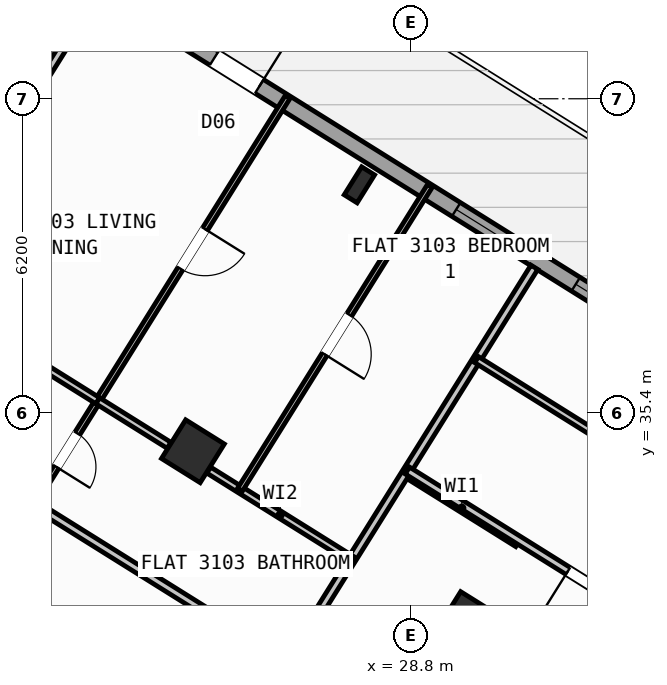
"""IFC4 building model, lengths in metres.
Left out: names, types, materials, properties, quantities, classifications, styles, units other than length and angle.
Written with IfcOpenShell. Run it as: python <this file> out.ifc"""

import sys

from ifc_helpers import new_model, si_unit, direction, frame, frame_2d, origin, origin_2d, place, context, subcontext, project, spatial, rectangle, hollow_rectangle, i_section, extrude, source, transform, mapped, element, fill, save


model = new_model("IFC4")
c1 = context("Model", 3, precision=1e-05, world=origin(), true_north=direction((0.0, 1.0)))
c2 = subcontext(c1, "Body", "Model", "MODEL_VIEW")
j1 = project(units=[si_unit("LENGTHUNIT", "METRE"), si_unit("PLANEANGLEUNIT", "RADIAN")], contexts=[c1])
p1 = place(None, origin())
s1 = spatial("IfcSite", under=j1, at=p1, CompositionType="ELEMENT")
p2 = place(p1, origin())
s2 = spatial("IfcBuilding", under=s1, at=p2, CompositionType="ELEMENT")
p3 = place(p2, frame((0.0, 0.0, 123.3)))
s3 = spatial("IfcBuildingStorey", under=s2, at=p3, CompositionType="ELEMENT", Elevation=123.3)
m1 = source(origin(), c2, "Body", "SweptSolid", [
    extrude(hollow_rectangle(XDim=0.9, YDim=0.9, WallThickness=0.036, at=origin_2d()), origin(), (0.0, 0.0, 1.0), 4.5),
])
p4 = place(p3, frame((29.928, 31.251, 0.0), z_axis=(0.0, 0.0, 1.0), x_axis=(-0.848048096156, 0.529919264233, 0.0)))
e1 = element("IfcColumn", 1, at=p4, inside=s3, PredefinedType="COLUMN", context=c2, shape_type="MappedRepresentation", body=[
    mapped(m1, transform((0.0, 0.0, 0.0), scale=1.0)),
])
m2 = source(origin(), c2, "Body", "SweptSolid", [
    extrude(i_section(OverallWidth=0.3, OverallDepth=0.65, WebThickness=0.016, FlangeThickness=0.031, at=origin_2d()), origin(), (0.0, 0.0, 1.0), 4.5),
])
p5 = place(p3, frame((27.786, 39.901, 0.0), z_axis=(0.0, 0.0, 1.0), x_axis=(-0.848048096156, 0.529919264233, 0.0)))
e2 = element("IfcColumn", 2, at=p5, inside=s3, PredefinedType="COLUMN", context=c2, shape_type="MappedRepresentation", body=[
    mapped(m2, transform((0.0, 0.0, 0.0), scale=1.0)),
])
p6 = place(p3, frame((24.5, 34.643, 0.0), z_axis=(0.0, 0.0, 1.0), x_axis=(-0.848048096156, 0.529919264233, 0.0)))
e3 = element("IfcColumn", 3, at=p6, inside=s3, PredefinedType="COLUMN", context=c2, shape_type="MappedRepresentation", body=[
    mapped(m1, transform((0.0, 0.0, 0.0), scale=1.0)),
])
p7 = place(p3, frame((17.424, 47.083, 0.0), z_axis=(0.0, 0.0, 1.0), x_axis=(0.848049927979, -0.529916332693, 0.0)))
e4 = element("IfcWall", 4, at=p7, inside=s3, PredefinedType="STANDARD", context=c2, shape_type="SweptSolid", body=[
    extrude(rectangle(XDim=29.223, YDim=0.32, at=frame_2d((14.612, 0.0))), origin(), (0.0, 0.0, 1.0), 4.22),
])
p8 = place(p7, frame((8.839, 0.0, 0.0)))
e5 = element("IfcOpeningElement", 5, at=p8, cuts=e4, PredefinedType="OPENING", context=c2, shape_type="SweptSolid", body=[
    extrude(rectangle(XDim=1.05, YDim=2.15, at=frame_2d((0.525, 1.075))), frame((0.0, 0.17, 0.0), z_axis=(0.0, -1.0, 0.0), x_axis=(1.0, 0.0, 0.0)), (0.0, 0.0, 1.0), 0.34),
])
p9 = place(p7, frame((0.719, 0.0, 0.85)))
e6 = element("IfcOpeningElement", 6, at=p9, cuts=e4, PredefinedType="OPENING", context=c2, shape_type="SweptSolid", body=[
    extrude(rectangle(XDim=1.8, YDim=1.5, at=frame_2d((0.9, 0.75))), frame((0.0, 0.17, 0.0), z_axis=(0.0, -1.0, 0.0), x_axis=(1.0, 0.0, 0.0)), (0.0, 0.0, 1.0), 0.34),
])
p10 = place(p7, frame((3.981, 0.0, 0.85)))
e7 = element("IfcOpeningElement", 7, at=p10, cuts=e4, PredefinedType="OPENING", context=c2, shape_type="SweptSolid", body=[
    extrude(rectangle(XDim=1.5, YDim=1.5, at=frame_2d((0.75, 0.75))), frame((0.0, 0.17, 0.0), z_axis=(0.0, -1.0, 0.0), x_axis=(1.0, 0.0, 0.0)), (0.0, 0.0, 1.0), 0.34),
])
p11 = place(p7, frame((7.021, 0.0, 0.95)))
e8 = element("IfcOpeningElement", 8, at=p11, cuts=e4, PredefinedType="OPENING", context=c2, shape_type="SweptSolid", body=[
    extrude(rectangle(XDim=1.2, YDim=1.4, at=frame_2d((0.6, 0.7))), frame((0.0, 0.17, 0.0), z_axis=(0.0, -1.0, 0.0), x_axis=(1.0, 0.0, 0.0)), (0.0, 0.0, 1.0), 0.34),
])
p12 = place(p7, frame((14.471, 0.0, 0.95)))
e9 = element("IfcOpeningElement", 9, at=p12, cuts=e4, PredefinedType="OPENING", context=c2, shape_type="SweptSolid", body=[
    extrude(rectangle(XDim=1.2, YDim=1.4, at=frame_2d((0.6, 0.7))), frame((0.0, 0.17, 0.0), z_axis=(0.0, -1.0, 0.0), x_axis=(1.0, 0.0, 0.0)), (0.0, 0.0, 1.0), 0.34),
])
p13 = place(p7, frame((17.254, 0.0, 1.0)))
e10 = element("IfcOpeningElement", 10, at=p13, cuts=e4, PredefinedType="OPENING", context=c2, shape_type="SweptSolid", body=[
    extrude(rectangle(XDim=0.9, YDim=1.25, at=frame_2d((0.45, 0.625))), frame((0.0, 0.17, 0.0), z_axis=(0.0, -1.0, 0.0), x_axis=(1.0, 0.0, 0.0)), (0.0, 0.0, 1.0), 0.34),
])
p14 = place(p7, frame((20.764, 0.0, 0.8)))
e11 = element("IfcOpeningElement", 11, at=p14, cuts=e4, PredefinedType="OPENING", context=c2, shape_type="SweptSolid", body=[
    extrude(rectangle(XDim=2.1, YDim=1.55, at=frame_2d((1.05, 0.775))), frame((0.0, 0.17, 0.0), z_axis=(0.0, -1.0, 0.0), x_axis=(1.0, 0.0, 0.0)), (0.0, 0.0, 1.0), 0.34),
])
p15 = place(p7, frame((25.403, 0.0, 0.8)))
e12 = element("IfcOpeningElement", 12, at=p15, cuts=e4, PredefinedType="OPENING", context=c2, shape_type="SweptSolid", body=[
    extrude(rectangle(XDim=2.1, YDim=1.55, at=frame_2d((1.05, 0.775))), frame((0.0, 0.17, 0.0), z_axis=(0.0, -1.0, 0.0), x_axis=(1.0, 0.0, 0.0)), (0.0, 0.0, 1.0), 0.34),
])
p16 = place(p3, frame((30.914, 32.829, 0.0), z_axis=(0.0, 0.0, 1.0), x_axis=(-0.848008813643, 0.529982124211, 0.0)))
e13 = element("IfcWall", 13, at=p16, inside=s3, PredefinedType="PARTITIONING", context=c2, shape_type="SweptSolid", body=[
    extrude(rectangle(XDim=2.61, YDim=0.16, at=frame_2d((1.305, 0.0))), origin(), (0.0, 0.0, 1.0), 4.21),
])
p17 = place(p3, frame((31.239, 38.274, 0.0), z_axis=(0.0, 0.0, 1.0), x_axis=(-0.529920220799, -0.848047498427, 0.0)))
e14 = element("IfcWall", 14, at=p17, inside=s3, PredefinedType="PARTITIONING", context=c2, shape_type="SweptSolid", body=[
    extrude(rectangle(XDim=9.2, YDim=0.16, at=frame_2d((4.6, 0.0))), origin(), (0.0, 0.0, 1.0), 4.21),
])
p18 = place(p3, frame((26.363, 30.472, 0.0), z_axis=(0.0, 0.0, 1.0), x_axis=(-0.848052408131, 0.529912363569, 0.0)))
e15 = element("IfcWall", 15, at=p18, inside=s3, PredefinedType="PARTITIONING", context=c2, shape_type="SweptSolid", body=[
    extrude(rectangle(XDim=16.73, YDim=0.16, at=frame_2d((8.365, 0.0))), origin(), (0.0, 0.0, 1.0), 4.21),
])
p19 = place(p18, frame((7.55, 0.0, 0.0)))
e16 = element("IfcOpeningElement", 16, at=p19, cuts=e15, PredefinedType="OPENING", context=c2, shape_type="SweptSolid", body=[
    extrude(rectangle(XDim=1.0, YDim=2.1, at=frame_2d((0.5, 1.05))), frame((0.0, 0.09, 0.0), z_axis=(0.0, -1.0, 0.0), x_axis=(1.0, 0.0, 0.0)), (0.0, 0.0, 1.0), 0.18),
])
p20 = place(p18, frame((11.14, 0.0, 0.0)))
e17 = element("IfcOpeningElement", 17, at=p20, cuts=e15, PredefinedType="OPENING", context=c2, shape_type="SweptSolid", body=[
    extrude(rectangle(XDim=1.0, YDim=2.1, at=frame_2d((0.5, 1.05))), frame((0.0, 0.09, 0.0), z_axis=(0.0, -1.0, 0.0), x_axis=(1.0, 0.0, 0.0)), (0.0, 0.0, 1.0), 0.18),
])
p21 = place(p3, frame((25.198, 28.606, 0.0), z_axis=(0.0, 0.0, 1.0), x_axis=(-0.848052408131, 0.529912363569, 0.0)))
e18 = element("IfcWall", 18, at=p21, inside=s3, PredefinedType="PARTITIONING", context=c2, shape_type="SweptSolid", body=[
    extrude(rectangle(XDim=16.73, YDim=0.16, at=frame_2d((8.365, 0.0))), origin(), (0.0, 0.0, 1.0), 4.21),
])
p22 = place(p21, frame((2.22, 0.0, 0.0)))
e19 = element("IfcOpeningElement", 19, at=p22, cuts=e18, PredefinedType="OPENING", context=c2, shape_type="SweptSolid", body=[
    extrude(rectangle(XDim=0.86, YDim=2.05, at=frame_2d((0.43, 1.025))), frame((0.0, 0.09, 0.0), z_axis=(0.0, -1.0, 0.0), x_axis=(1.0, 0.0, 0.0)), (0.0, 0.0, 1.0), 0.18),
])
p23 = place(p21, frame((12.084, 0.0, 0.0)))
e20 = element("IfcOpeningElement", 20, at=p23, cuts=e18, PredefinedType="OPENING", context=c2, shape_type="SweptSolid", body=[
    extrude(rectangle(XDim=1.0, YDim=2.1, at=frame_2d((0.5, 1.05))), frame((0.0, 0.09, 0.0), z_axis=(0.0, -1.0, 0.0), x_axis=(1.0, 0.0, 0.0)), (0.0, 0.0, 1.0), 0.18),
])
p24 = place(p3, frame((22.18, 43.006, 0.0), z_axis=(0.0, 0.0, 1.0), x_axis=(-0.529913610495, -0.848051628978, 0.0)))
e21 = element("IfcWall", 21, at=p24, inside=s3, PredefinedType="PARTITIONING", context=c2, shape_type="SweptSolid", body=[
    extrude(rectangle(XDim=5.401, YDim=0.16, at=frame_2d((2.7, 0.0))), origin(), (0.0, 0.0, 1.0), 4.21),
])
p25 = place(p3, frame((26.37, 41.635, 0.0), z_axis=(0.0, 0.0, 1.0), x_axis=(-0.529917830441, -0.848048992088, 0.0)))
e22 = element("IfcWall", 22, at=p25, inside=s3, PredefinedType="PARTITIONING", context=c2, shape_type="SweptSolid", body=[
    extrude(rectangle(XDim=9.47, YDim=0.11, at=frame_2d((4.735, 0.0))), origin(), (0.0, 0.0, 1.0), 3.865),
])
p26 = place(p25, frame((7.83, 0.0, 0.0)))
e23 = element("IfcOpeningElement", 23, at=p26, cuts=e22, PredefinedType="OPENING", context=c2, shape_type="SweptSolid", body=[
    extrude(rectangle(XDim=0.78, YDim=2.05, at=frame_2d((0.39, 1.025))), frame((0.0, 0.065, 0.0), z_axis=(0.0, -1.0, 0.0), x_axis=(1.0, 0.0, 0.0)), (0.0, 0.0, 1.0), 0.13),
])
p27 = place(p25, frame((3.075, 0.0, 0.0)))
e24 = element("IfcOpeningElement", 24, at=p27, cuts=e22, PredefinedType="OPENING", context=c2, shape_type="SweptSolid", body=[
    extrude(rectangle(XDim=0.92, YDim=2.08, at=frame_2d((0.46, 1.04))), frame((0.0, 0.065, 0.0), z_axis=(0.0, -1.0, 0.0), x_axis=(1.0, 0.0, 0.0)), (0.0, 0.0, 1.0), 0.13),
])
p28 = place(p3, frame((22.623, 35.639, 0.0), z_axis=(0.0, 0.0, 1.0), x_axis=(-0.8480485946, 0.529918466555, 0.0)))
e25 = element("IfcWall", 25, at=p28, inside=s3, PredefinedType="PLUMBINGWALL", context=c2, shape_type="SweptSolid", body=[
    extrude(rectangle(XDim=3.818, YDim=0.14, at=frame_2d((1.909, 0.0))), origin(), (0.0, 0.0, 1.0), 2.395),
])
p29 = place(p28, frame((1.68, 0.0, 0.0)))
e26 = element("IfcOpeningElement", 26, at=p29, cuts=e25, PredefinedType="OPENING", context=c2, shape_type="SweptSolid", body=[
    extrude(rectangle(XDim=0.92, YDim=2.08, at=frame_2d((0.46, 1.04))), frame((0.0, 0.08, 0.0), z_axis=(0.0, -1.0, 0.0), x_axis=(1.0, 0.0, 0.0)), (0.0, 0.0, 1.0), 0.16),
])
p30 = place(p3, frame((27.635, 32.507, 0.0), z_axis=(0.0, 0.0, 1.0), x_axis=(-0.848064240775, 0.529893426567, 0.0)))
e27 = element("IfcWall", 27, at=p30, inside=s3, PredefinedType="PLUMBINGWALL", context=c2, shape_type="SweptSolid", body=[
    extrude(rectangle(XDim=3.328, YDim=0.14, at=frame_2d((1.664, 0.0))), origin(), (0.0, 0.0, 1.0), 2.395),
])
p31 = place(p3, frame((24.029, 34.76, 0.0), z_axis=(0.0, 0.0, 1.0), x_axis=(-0.848023120795, 0.529959231071, 0.0)))
e28 = element("IfcWall", 28, at=p31, inside=s3, PredefinedType="PLUMBINGWALL", context=c2, shape_type="SweptSolid", body=[
    extrude(rectangle(XDim=1.658, YDim=0.14, at=frame_2d((0.829, 0.0))), origin(), (0.0, 0.0, 1.0), 2.395),
])
p32 = place(p3, frame((29.177, 39.881, 0.0), z_axis=(0.0, 0.0, 1.0), x_axis=(-0.529930649952, -0.848040981463, 0.0)))
e29 = element("IfcWall", 29, at=p32, inside=s3, PredefinedType="PARTITIONING", context=c2, shape_type="SweptSolid", body=[
    extrude(rectangle(XDim=7.07, YDim=0.11, at=frame_2d((3.535, 0.0))), origin(), (0.0, 0.0, 1.0), 4.21),
])
p33 = place(p32, frame((3.0, 0.0, 0.0)))
e30 = element("IfcOpeningElement", 30, at=p33, cuts=e29, PredefinedType="OPENING", context=c2, shape_type="SweptSolid", body=[
    extrude(rectangle(XDim=0.92, YDim=2.08, at=frame_2d((0.46, 1.04))), frame((0.0, 0.065, 0.0), z_axis=(0.0, -1.0, 0.0), x_axis=(1.0, 0.0, 0.0)), (0.0, 0.0, 1.0), 0.13),
])
p34 = place(p3, frame((41.936, 26.012, 0.0), z_axis=(0.0, 0.0, 1.0), x_axis=(-0.848051154596, 0.529914369676, 0.0)))
e31 = element("IfcWall", 31, at=p34, inside=s3, PredefinedType="PARTITIONING", context=c2, shape_type="SweptSolid", body=[
    extrude(rectangle(XDim=15.57, YDim=0.16, at=frame_2d((7.785, 0.0))), origin(), (0.0, 0.0, 1.0), 4.21),
])
p35 = place(p34, frame((10.83, 0.0, 0.0)))
e32 = element("IfcOpeningElement", 32, at=p35, cuts=e31, PredefinedType="OPENING", context=c2, shape_type="SweptSolid", body=[
    extrude(rectangle(XDim=1.0, YDim=2.1, at=frame_2d((0.5, 1.05))), frame((0.0, 0.09, 0.0), z_axis=(0.0, -1.0, 0.0), x_axis=(1.0, 0.0, 0.0)), (0.0, 0.0, 1.0), 0.18),
])
p36 = place(p3, frame((42.226, 28.873, 0.0), z_axis=(0.0, 0.0, 1.0), x_axis=(-0.848049134363, 0.529917602752, 0.0)))
e33 = element("IfcWall", 33, at=p36, inside=s3, PredefinedType="PLUMBINGWALL", context=c2, shape_type="SweptSolid", body=[
    extrude(rectangle(XDim=14.3, YDim=0.14, at=frame_2d((7.15, 0.0))), origin(), (0.0, 0.0, 1.0), 4.21),
])
p37 = place(p36, frame((9.57, 0.0, 0.0)))
e34 = element("IfcOpeningElement", 34, at=p37, cuts=e33, PredefinedType="OPENING", context=c2, shape_type="SweptSolid", body=[
    extrude(rectangle(XDim=0.92, YDim=2.08, at=frame_2d((0.46, 1.04))), frame((0.0, 0.08, 0.0), z_axis=(0.0, -1.0, 0.0), x_axis=(1.0, 0.0, 0.0)), (0.0, 0.0, 1.0), 0.16),
])
m3 = source(origin(), c2, "Body", "SweptSolid", [
    extrude(rectangle(XDim=1.05, YDim=2.15, at=frame_2d((0.525, 1.075))), frame((0.0, 0.025, 0.0), z_axis=(0.0, -1.0, 0.0), x_axis=(1.0, 0.0, 0.0)), (0.0, 0.0, 1.0), 0.05),
])
p38 = place(p8, origin())
e35 = element("IfcDoor", 35, at=p38, inside=s3, OperationType="SINGLE_SWING_RIGHT", PredefinedType="DOOR", context=c2, shape_type="MappedRepresentation", body=[
    mapped(m3, transform((0.0, 0.0, 0.0), scale=1.0)),
])
fill(e5, e35)
m4 = source(origin(), c2, "Body", "SweptSolid", [
    extrude(rectangle(XDim=1.2, YDim=1.4, at=frame_2d((0.6, 0.7))), frame((0.0, 0.03, 0.0), z_axis=(0.0, -1.0, 0.0), x_axis=(1.0, 0.0, 0.0)), (0.0, 0.0, 1.0), 0.06),
])
p39 = place(p12, origin())
e36 = element("IfcWindow", 36, at=p39, inside=s3, PartitioningType="SINGLE_PANEL", PredefinedType="WINDOW", context=c2, shape_type="MappedRepresentation", body=[
    mapped(m4, transform((0.0, 0.0, 0.0), scale=1.0)),
])
fill(e9, e36)
m5 = source(origin(), c2, "Body", "SweptSolid", [
    extrude(rectangle(XDim=0.9, YDim=1.25, at=frame_2d((0.45, 0.625))), frame((0.0, 0.03, 0.0), z_axis=(0.0, -1.0, 0.0), x_axis=(1.0, 0.0, 0.0)), (0.0, 0.0, 1.0), 0.06),
])
p40 = place(p13, origin())
e37 = element("IfcWindow", 37, at=p40, inside=s3, PartitioningType="SINGLE_PANEL", PredefinedType="WINDOW", context=c2, shape_type="MappedRepresentation", body=[
    mapped(m5, transform((0.0, 0.0, 0.0), scale=1.0)),
])
fill(e10, e37)
m6 = source(origin(), c2, "Body", "SweptSolid", [
    extrude(rectangle(XDim=0.78, YDim=2.05, at=frame_2d((0.39, 1.025))), frame((0.0, 0.025, 0.0), z_axis=(0.0, -1.0, 0.0), x_axis=(1.0, 0.0, 0.0)), (0.0, 0.0, 1.0), 0.05),
])
p41 = place(p26, origin())
e38 = element("IfcDoor", 38, at=p41, inside=s3, OperationType="SINGLE_SWING_RIGHT", PredefinedType="DOOR", context=c2, shape_type="MappedRepresentation", body=[
    mapped(m6, transform((0.0, 0.0, 0.0), scale=1.0)),
])
fill(e23, e38)
m7 = source(origin(), c2, "Body", "SweptSolid", [
    extrude(rectangle(XDim=0.92, YDim=2.08, at=frame_2d((0.46, 1.04))), frame((0.0, 0.025, 0.0), z_axis=(0.0, -1.0, 0.0), x_axis=(1.0, 0.0, 0.0)), (0.0, 0.0, 1.0), 0.05),
])
p42 = place(p27, origin())
e39 = element("IfcDoor", 39, at=p42, inside=s3, OperationType="SINGLE_SWING_LEFT", PredefinedType="DOOR", context=c2, shape_type="MappedRepresentation", body=[
    mapped(m7, transform((0.0, 0.0, 0.0), scale=1.0)),
])
fill(e24, e39)
p43 = place(p33, origin())
e40 = element("IfcDoor", 40, at=p43, inside=s3, OperationType="SINGLE_SWING_RIGHT", PredefinedType="DOOR", context=c2, shape_type="MappedRepresentation", body=[
    mapped(m7, transform((0.0, 0.0, 0.0), scale=1.0)),
])
fill(e30, e40)
m8 = source(origin(), c2, "Body", "SweptSolid", [
    extrude(rectangle(XDim=1.0, YDim=2.1, at=frame_2d((0.5, 1.05))), frame((0.0, 0.025, 0.0), z_axis=(0.0, -1.0, 0.0), x_axis=(1.0, 0.0, 0.0)), (0.0, 0.0, 1.0), 0.05),
])
p44 = place(p35, origin())
e41 = element("IfcDoor", 41, at=p44, inside=s3, OperationType="SINGLE_SWING_RIGHT", PredefinedType="DOOR", context=c2, shape_type="MappedRepresentation", body=[
    mapped(m8, transform((0.0, 0.0, 0.0), scale=1.0)),
])
fill(e32, e41)
save(model, sys.argv[1])
